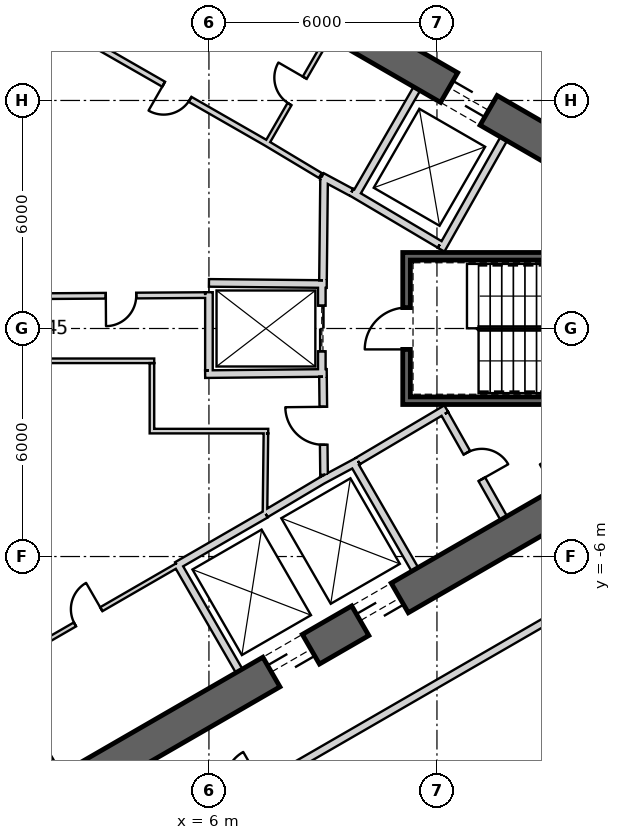
"""IFC4 building model, lengths in metres.
Left out: names, types, materials, properties, quantities, classifications, styles, units other than length and angle.
Written with IfcOpenShell. Run it as: python <this file> out.ifc"""

import sys

from ifc_helpers import new_model, si_unit, direction, frame, frame_2d, origin, place, context, subcontext, project, spatial, rectangle, extrude, element, fill, save


model = new_model("IFC4")
c1 = context("Model", 3, precision=1e-05, world=origin(), true_north=direction((0.0, 1.0)))
c2 = subcontext(c1, "Body", "Model", "MODEL_VIEW")
j1 = project(units=[si_unit("LENGTHUNIT", "METRE"), si_unit("PLANEANGLEUNIT", "RADIAN")], contexts=[c1])
p1 = place(None, origin())
s1 = spatial("IfcSite", under=j1, at=p1, CompositionType="ELEMENT")
p2 = place(p1, origin())
s2 = spatial("IfcBuilding", under=s1, at=p2, CompositionType="ELEMENT")
p3 = place(p2, frame((0.0, 0.0, 380.6)))
s3 = spatial("IfcBuildingStorey", under=s2, at=p3, CompositionType="ELEMENT", Elevation=380.6)
p4 = place(p3, frame((19.475, 2.208, 0.0), z_axis=(0.0, 0.0, 1.0), x_axis=(-0.866028369851, 0.499994862586, 0.0)))
e1 = element("IfcWall", 1, at=p4, inside=s3, PredefinedType="SHEAR", context=c2, shape_type="SweptSolid", body=[
    extrude(rectangle(XDim=31.523, YDim=0.9, at=frame_2d((15.762, 0.0))), origin(), (0.0, 0.0, 1.0), 3.9),
])
p5 = place(p4, frame((7.062, 0.0, 0.0)))
e2 = element("IfcOpeningElement", 2, at=p5, cuts=e1, PredefinedType="OPENING", context=c2, shape_type="SweptSolid", body=[
    extrude(rectangle(XDim=1.2, YDim=2.4, at=frame_2d((0.6, 1.2))), frame((0.0, 0.46, 0.0), z_axis=(0.0, -1.0, 0.0), x_axis=(1.0, 0.0, 0.0)), (0.0, 0.0, 1.0), 0.92),
])
p6 = place(p4, frame((3.612, 0.0, 0.0)))
e3 = element("IfcOpeningElement", 3, at=p6, cuts=e1, PredefinedType="OPENING", context=c2, shape_type="SweptSolid", body=[
    extrude(rectangle(XDim=1.2, YDim=2.4, at=frame_2d((0.6, 1.2))), frame((0.0, 0.46, 0.0), z_axis=(0.0, -1.0, 0.0), x_axis=(1.0, 0.0, 0.0)), (0.0, 0.0, 1.0), 0.92),
])
p7 = place(p4, frame((26.712, 0.0, 0.0)))
e4 = element("IfcOpeningElement", 4, at=p7, cuts=e1, PredefinedType="OPENING", context=c2, shape_type="SweptSolid", body=[
    extrude(rectangle(XDim=1.2, YDim=2.4, at=frame_2d((0.6, 1.2))), frame((0.0, 0.46, 0.0), z_axis=(0.0, -1.0, 0.0), x_axis=(1.0, 0.0, 0.0)), (0.0, 0.0, 1.0), 0.92),
])
p8 = place(p3, frame((-7.825, -17.97, 0.0), z_axis=(0.0, 0.0, 1.0), x_axis=(0.866028369851, 0.499994862586, 0.0)))
e5 = element("IfcWall", 5, at=p8, inside=s3, PredefinedType="SHEAR", context=c2, shape_type="SweptSolid", body=[
    extrude(rectangle(XDim=31.523, YDim=0.9, at=frame_2d((15.762, 0.0))), origin(), (0.0, 0.0, 1.0), 3.9),
])
p9 = place(p8, frame((17.862, 0.0, 0.0)))
e6 = element("IfcOpeningElement", 6, at=p9, cuts=e5, PredefinedType="OPENING", context=c2, shape_type="SweptSolid", body=[
    extrude(rectangle(XDim=1.2, YDim=2.4, at=frame_2d((0.6, 1.2))), frame((0.0, 0.46, 0.0), z_axis=(0.0, -1.0, 0.0), x_axis=(1.0, 0.0, 0.0)), (0.0, 0.0, 1.0), 0.92),
])
p10 = place(p8, frame((20.562, 0.0, 0.0)))
e7 = element("IfcOpeningElement", 7, at=p10, cuts=e5, PredefinedType="OPENING", context=c2, shape_type="SweptSolid", body=[
    extrude(rectangle(XDim=1.2, YDim=2.4, at=frame_2d((0.6, 1.2))), frame((0.0, 0.46, 0.0), z_axis=(0.0, -1.0, 0.0), x_axis=(1.0, 0.0, 0.0)), (0.0, 0.0, 1.0), 0.92),
])
p11 = place(p8, frame((26.712, 0.0, 0.0)))
e8 = element("IfcOpeningElement", 8, at=p11, cuts=e5, PredefinedType="OPENING", context=c2, shape_type="SweptSolid", body=[
    extrude(rectangle(XDim=1.2, YDim=2.4, at=frame_2d((0.6, 1.2))), frame((0.0, 0.46, 0.0), z_axis=(0.0, -1.0, 0.0), x_axis=(1.0, 0.0, 0.0)), (0.0, 0.0, 1.0), 0.92),
])
p12 = place(p8, frame((3.612, 0.0, 0.0)))
e9 = element("IfcOpeningElement", 9, at=p12, cuts=e5, PredefinedType="OPENING", context=c2, shape_type="SweptSolid", body=[
    extrude(rectangle(XDim=1.2, YDim=2.4, at=frame_2d((0.6, 1.2))), frame((0.0, 0.46, 0.0), z_axis=(0.0, -1.0, 0.0), x_axis=(1.0, 0.0, 0.0)), (0.0, 0.0, 1.0), 0.92),
])
p13 = place(p3, frame((9.847, 3.495, 0.0), z_axis=(0.0, 0.0, 1.0), x_axis=(0.499984717929, 0.866034226713, 0.0)))
e10 = element("IfcWall", 10, at=p13, inside=s3, PredefinedType="PLUMBINGWALL", context=c2, shape_type="SweptSolid", body=[
    extrude(rectangle(XDim=3.25, YDim=0.2, at=frame_2d((1.625, 0.0))), origin(), (0.0, 0.0, 1.0), 3.6),
])
p14 = place(p3, frame((12.11, 2.073, 0.0), z_axis=(0.0, 0.0, 1.0), x_axis=(0.49196600604, 0.870614408852, 0.0)))
e11 = element("IfcWall", 11, at=p14, inside=s3, PredefinedType="PLUMBINGWALL", context=c2, shape_type="SweptSolid", body=[
    extrude(rectangle(XDim=3.35, YDim=0.2, at=frame_2d((1.675, 0.0))), origin(), (0.0, 0.0, 1.0), 3.6),
])
p15 = place(p3, frame((12.073, 2.211, 0.0), z_axis=(0.0, 0.0, 1.0), x_axis=(-0.860414880418, 0.509594185166, 0.0)))
e12 = element("IfcWall", 12, at=p15, inside=s3, PredefinedType="PLUMBINGWALL", context=c2, shape_type="SweptSolid", body=[
    extrude(rectangle(XDim=2.7, YDim=0.2, at=frame_2d((1.35, 0.0))), origin(), (0.0, 0.0, 1.0), 3.6),
])
p16 = place(p3, frame((6.795, -9.01, 0.0), z_axis=(0.0, 0.0, 1.0), x_axis=(-0.499984717929, 0.866034226713, 0.0)))
e13 = element("IfcWall", 13, at=p16, inside=s3, PredefinedType="PLUMBINGWALL", context=c2, shape_type="SweptSolid", body=[
    extrude(rectangle(XDim=3.25, YDim=0.2, at=frame_2d((1.625, 0.0))), origin(), (0.0, 0.0, 1.0), 3.6),
])
p17 = place(p3, frame((5.159, -6.236, 0.0), z_axis=(0.0, 0.0, 1.0), x_axis=(0.866036505625, 0.499980770555, 0.0)))
e14 = element("IfcWall", 14, at=p17, inside=s3, PredefinedType="PLUMBINGWALL", context=c2, shape_type="SweptSolid", body=[
    extrude(rectangle(XDim=2.7, YDim=0.2, at=frame_2d((1.35, 0.0))), origin(), (0.0, 0.0, 1.0), 3.6),
])
p18 = place(p3, frame((9.795, -3.525, 0.0), z_axis=(0.0, 0.0, 1.0), x_axis=(0.499984717929, -0.866034226713, 0.0)))
e15 = element("IfcWall", 15, at=p18, inside=s3, PredefinedType="PLUMBINGWALL", context=c2, shape_type="SweptSolid", body=[
    extrude(rectangle(XDim=3.25, YDim=0.2, at=frame_2d((1.625, 0.0))), origin(), (0.0, 0.0, 1.0), 3.6),
])
p19 = place(p3, frame((8.974, -3.999, 0.0), z_axis=(0.0, 0.0, 1.0), x_axis=(0.880907015104, 0.473289373154, 0.0)))
e16 = element("IfcWall", 16, at=p19, inside=s3, PredefinedType="PLUMBINGWALL", context=c2, shape_type="SweptSolid", body=[
    extrude(rectangle(XDim=1.078, YDim=0.2, at=frame_2d((0.539, 0.0))), origin(), (0.0, 0.0, 1.0), 3.6),
])
p20 = place(p3, frame((7.497, -4.886, 0.0), z_axis=(0.0, 0.0, 1.0), x_axis=(0.857516281273, 0.51445682749, 0.0)))
e17 = element("IfcWall", 17, at=p20, inside=s3, PredefinedType="PLUMBINGWALL", context=c2, shape_type="SweptSolid", body=[
    extrude(rectangle(XDim=1.845, YDim=0.2, at=frame_2d((0.922, 0.0))), origin(), (0.0, 0.0, 1.0), 3.6),
])
p21 = place(p3, frame((19.2, 1.9, -0.3), z_axis=(0.0, 0.0, 1.0), x_axis=(-1.0, 0.0, 0.0)))
e18 = element("IfcWall", 18, at=p21, inside=s3, PredefinedType="SHEAR", context=c2, shape_type="SweptSolid", body=[
    extrude(rectangle(XDim=8.1, YDim=0.2, at=frame_2d((4.05, 0.0))), origin(), (0.0, 0.0, 1.0), 3.9),
])
p22 = place(p3, frame((11.1, -1.9, -0.3), z_axis=(0.0, 0.0, 1.0), x_axis=(1.0, 0.0, 0.0)))
e19 = element("IfcWall", 19, at=p22, inside=s3, PredefinedType="SHEAR", context=c2, shape_type="SweptSolid", body=[
    extrude(rectangle(XDim=7.9, YDim=0.2, at=frame_2d((3.95, 0.0))), origin(), (0.0, 0.0, 1.0), 3.9),
])
p23 = place(p3, frame((11.2, -1.8, -0.3), z_axis=(0.0, 0.0, 1.0), x_axis=(0.0, 1.0, 0.0)))
e20 = element("IfcWall", 20, at=p23, inside=s3, PredefinedType="SHEAR", context=c2, shape_type="SweptSolid", body=[
    extrude(rectangle(XDim=3.6, YDim=0.2, at=frame_2d((1.8, 0.0))), origin(), (0.0, 0.0, 1.0), 3.9),
])
p24 = place(p23, frame((1.25, 0.0, 0.3)))
e21 = element("IfcOpeningElement", 21, at=p24, cuts=e20, PredefinedType="OPENING", context=c2, shape_type="SweptSolid", body=[
    extrude(rectangle(XDim=1.1, YDim=2.1, at=frame_2d((0.55, 1.05))), frame((0.0, 0.11, 0.0), z_axis=(0.0, -1.0, 0.0), x_axis=(1.0, 0.0, 0.0)), (0.0, 0.0, 1.0), 0.22),
])
p25 = place(p3, frame((8.97, 1.2, 0.0), z_axis=(0.0, 0.0, 1.0), x_axis=(0.0, -1.0, 0.0)))
e22 = element("IfcWall", 22, at=p25, inside=s3, PredefinedType="PLUMBINGWALL", context=c2, shape_type="SweptSolid", body=[
    extrude(rectangle(XDim=2.4, YDim=0.2, at=frame_2d((1.2, 0.0))), origin(), (0.0, 0.0, 1.0), 3.6),
])
p26 = place(p25, frame((0.6, 0.0, 0.0)))
e23 = element("IfcOpeningElement", 23, at=p26, cuts=e22, PredefinedType="OPENING", context=c2, shape_type="SweptSolid", body=[
    extrude(rectangle(XDim=1.2, YDim=2.4, at=frame_2d((0.6, 1.2))), frame((0.0, 0.11, 0.0), z_axis=(0.0, -1.0, 0.0), x_axis=(1.0, 0.0, 0.0)), (0.0, 0.0, 1.0), 0.22),
])
p27 = place(p3, frame((9.1, -1.169, 0.0), z_axis=(0.0, 0.0, 1.0), x_axis=(-0.999949988, -0.010001074852, 0.0)))
e24 = element("IfcWall", 24, at=p27, inside=s3, PredefinedType="PLUMBINGWALL", context=c2, shape_type="SweptSolid", body=[
    extrude(rectangle(XDim=3.1, YDim=0.2, at=frame_2d((1.55, 0.0))), origin(), (0.0, 0.0, 1.0), 3.6),
])
p28 = place(p3, frame((6.0, -1.104, 0.0), z_axis=(0.0, 0.0, 1.0), x_axis=(0.0, 1.0, 0.0)))
e25 = element("IfcWall", 25, at=p28, inside=s3, PredefinedType="PLUMBINGWALL", context=c2, shape_type="SweptSolid", body=[
    extrude(rectangle(XDim=2.405, YDim=0.2, at=frame_2d((1.202, 0.0))), origin(), (0.0, 0.0, 1.0), 3.6),
])
p29 = place(p3, frame((9.1, 1.169, 0.0), z_axis=(0.0, 0.0, 1.0), x_axis=(-0.99994990606, 0.010009264196, 0.0)))
e26 = element("IfcWall", 26, at=p29, inside=s3, PredefinedType="PLUMBINGWALL", context=c2, shape_type="SweptSolid", body=[
    extrude(rectangle(XDim=3.0, YDim=0.2, at=frame_2d((1.5, 0.0))), origin(), (0.0, 0.0, 1.0), 3.6),
])
p30 = place(p3, frame((8.974, 3.999, 0.0), z_axis=(0.0, 0.0, 1.0), x_axis=(0.880917147855, -0.473270513147, 0.0)))
e27 = element("IfcWall", 27, at=p30, inside=s3, PredefinedType="PARTITIONING", context=c2, shape_type="SweptSolid", body=[
    extrude(rectangle(XDim=0.878, YDim=0.2, at=frame_2d((0.439, 0.0))), origin(), (0.0, 0.0, 1.0), 3.6),
])
p31 = place(p3, frame((7.53, 4.833, 0.0), z_axis=(0.0, 0.0, 1.0), x_axis=(-0.863270393362, 0.50474174381, 0.0)))
e28 = element("IfcWall", 28, at=p31, inside=s3, PredefinedType="PLUMBINGWALL", context=c2, shape_type="SweptSolid", body=[
    extrude(rectangle(XDim=5.455, YDim=0.15, at=frame_2d((2.728, 0.0))), origin(), (0.0, 0.0, 1.0), 3.6),
])
p32 = place(p3, frame((7.55, 4.821, 0.0), z_axis=(0.0, 0.0, 1.0), x_axis=(0.866019818373, -0.500009674092, 0.0)))
e29 = element("IfcWall", 29, at=p32, inside=s3, PredefinedType="PARTITIONING", context=c2, shape_type="SweptSolid", body=[
    extrude(rectangle(XDim=1.594, YDim=0.12, at=frame_2d((0.797, 0.0))), origin(), (0.0, 0.0, 1.0), 3.6),
])
p33 = place(p32, frame((0.397, 0.0, 0.0)))
e30 = element("IfcOpeningElement", 30, at=p33, cuts=e29, PredefinedType="OPENING", context=c2, shape_type="SweptSolid", body=[
    extrude(rectangle(XDim=0.8, YDim=2.1, at=frame_2d((0.4, 1.05))), frame((0.0, 0.07, 0.0), z_axis=(0.0, -1.0, 0.0), x_axis=(1.0, 0.0, 0.0)), (0.0, 0.0, 1.0), 0.14),
])
p34 = place(p3, frame((4.405, -10.389, 0.0), z_axis=(0.0, 0.0, 1.0), x_axis=(-0.500017246033, 0.866015446554, 0.0)))
e31 = element("IfcWall", 31, at=p34, inside=s3, PredefinedType="PARTITIONING", context=c2, shape_type="SweptSolid", body=[
    extrude(rectangle(XDim=3.25, YDim=0.12, at=frame_2d((1.625, 0.0))), origin(), (0.0, 0.0, 1.0), 3.6),
])
p35 = place(p34, frame((1.225, 0.0, 0.0)))
e32 = element("IfcOpeningElement", 32, at=p35, cuts=e31, PredefinedType="OPENING", context=c2, shape_type="SweptSolid", body=[
    extrude(rectangle(XDim=0.8, YDim=2.1, at=frame_2d((0.4, 1.05))), frame((0.0, 0.07, 0.0), z_axis=(0.0, -1.0, 0.0), x_axis=(1.0, 0.0, 0.0)), (0.0, 0.0, 1.0), 0.14),
])
p36 = place(p3, frame((0.42, -8.938, 0.0), z_axis=(0.0, 0.0, 1.0), x_axis=(0.871409832999, 0.490555708306, 0.0)))
e33 = element("IfcWall", 33, at=p36, inside=s3, PredefinedType="PLUMBINGWALL", context=c2, shape_type="SweptSolid", body=[
    extrude(rectangle(XDim=2.755, YDim=0.15, at=frame_2d((1.377, 0.0))), origin(), (0.0, 0.0, 1.0), 3.6),
])
p37 = place(p3, frame((2.821, -7.586, 0.0), z_axis=(0.0, 0.0, 1.0), x_axis=(0.866019956843, 0.50000943426, 0.0)))
e34 = element("IfcWall", 34, at=p37, inside=s3, PredefinedType="PLUMBINGWALL", context=c2, shape_type="SweptSolid", body=[
    extrude(rectangle(XDim=2.7, YDim=0.15, at=frame_2d((1.35, 0.0))), origin(), (0.0, 0.0, 1.0), 3.6),
])
p38 = place(p3, frame((12.245, -2.109, 0.0), z_axis=(0.0, 0.0, 1.0), x_axis=(-0.860414880418, -0.509594185166, 0.0)))
e35 = element("IfcWall", 35, at=p38, inside=s3, PredefinedType="PARTITIONING", context=c2, shape_type="SweptSolid", body=[
    extrude(rectangle(XDim=2.7, YDim=0.2, at=frame_2d((1.35, 0.0))), origin(), (0.0, 0.0, 1.0), 3.6),
])
p39 = place(p3, frame((13.758, -4.99, 0.0), z_axis=(0.0, 0.0, 1.0), x_axis=(-0.491993409184, 0.87059892334, 0.0)))
e36 = element("IfcWall", 36, at=p39, inside=s3, PredefinedType="PARTITIONING", context=c2, shape_type="SweptSolid", body=[
    extrude(rectangle(XDim=3.15, YDim=0.2, at=frame_2d((1.575, 0.0))), origin(), (0.0, 0.0, 1.0), 3.6),
])
p40 = place(p39, frame((1.175, 0.0, 0.0)))
e37 = element("IfcOpeningElement", 37, at=p40, cuts=e36, PredefinedType="OPENING", context=c2, shape_type="SweptSolid", body=[
    extrude(rectangle(XDim=0.8, YDim=2.1, at=frame_2d((0.4, 1.05))), frame((0.0, 0.11, 0.0), z_axis=(0.0, -1.0, 0.0), x_axis=(1.0, 0.0, 0.0)), (0.0, 0.0, 1.0), 0.22),
])
p41 = place(p3, frame((9.029, -3.851, 0.0), z_axis=(0.0, 0.0, 1.0), x_axis=(-0.010784614026, 0.999941844359, 0.0)))
e38 = element("IfcWall", 38, at=p41, inside=s3, PredefinedType="PARTITIONING", context=c2, shape_type="SweptSolid", body=[
    extrude(rectangle(XDim=2.581, YDim=0.2, at=frame_2d((1.291, 0.0))), origin(), (0.0, 0.0, 1.0), 3.6),
])
p42 = place(p3, frame((9.001, 1.27, 0.0), z_axis=(0.0, 0.0, 1.0), x_axis=(0.010723968736, 0.999942496594, 0.0)))
e39 = element("IfcWall", 39, at=p42, inside=s3, PredefinedType="PARTITIONING", context=c2, shape_type="SweptSolid", body=[
    extrude(rectangle(XDim=2.709, YDim=0.2, at=frame_2d((1.354, 0.0))), origin(), (0.0, 0.0, 1.0), 3.6),
])
p43 = place(p42, frame((0.848, 0.0, 0.0)))
e40 = element("IfcOpeningElement", 40, at=p43, cuts=e39, PredefinedType="OPENING", context=c2, shape_type="SweptSolid", body=[
    extrude(rectangle(XDim=1.0, YDim=2.1, at=frame_2d((0.5, 1.05))), frame((0.0, 0.11, 0.0), z_axis=(0.0, -1.0, 0.0), x_axis=(1.0, 0.0, 0.0)), (0.0, 0.0, 1.0), 0.22),
])
p44 = place(p3, frame((5.548, -1.0, 0.0), z_axis=(0.0, 0.0, 1.0), x_axis=(-0.772345431507, -0.635202750648, 0.0)))
e41 = element("IfcWall", 41, at=p44, inside=s3, PredefinedType="PLUMBINGWALL", context=c2, shape_type="SweptSolid", body=[
    extrude(rectangle(XDim=7.415, YDim=0.15, at=frame_2d((3.707, 0.0))), origin(), (0.0, 0.0, 1.0), 3.6),
])
p45 = place(p3, frame((5.9, -1.03, 0.0), z_axis=(0.0, 0.0, 1.0), x_axis=(-1.0, 0.0, 0.0)))
e42 = element("IfcWall", 42, at=p45, inside=s3, PredefinedType="PLUMBINGWALL", context=c2, shape_type="SweptSolid", body=[
    extrude(rectangle(XDim=0.4, YDim=0.15, at=frame_2d((0.2, 0.0))), origin(), (0.0, 0.0, 1.0), 3.6),
])
p46 = place(p3, frame((5.5, -1.0, 0.0), z_axis=(0.0, 0.0, 1.0), x_axis=(-1.0, 0.0, 0.0)))
e43 = element("IfcWall", 43, at=p46, inside=s3, PredefinedType="PARTITIONING", context=c2, shape_type="SweptSolid", body=[
    extrude(rectangle(XDim=3.836, YDim=0.12, at=frame_2d((1.918, 0.0))), origin(), (0.0, 0.0, 1.0), 3.6),
])
p47 = place(p46, frame((1.518, 0.0, 0.0)))
e44 = element("IfcOpeningElement", 44, at=p47, cuts=e43, PredefinedType="OPENING", context=c2, shape_type="SweptSolid", body=[
    extrude(rectangle(XDim=0.8, YDim=2.1, at=frame_2d((0.4, 1.05))), frame((0.0, 0.07, 0.0), z_axis=(0.0, -1.0, 0.0), x_axis=(1.0, 0.0, 0.0)), (0.0, 0.0, 1.0), 0.14),
])
p48 = place(p3, frame((7.501, 2.625, 0.0), z_axis=(0.0, 0.0, 1.0), x_axis=(-0.011798588722, 0.99993039423, 0.0)))
e45 = element("IfcWall", 45, at=p48, inside=s3, PredefinedType="PLUMBINGWALL", context=c2, shape_type="SweptSolid", body=[
    extrude(rectangle(XDim=2.152, YDim=0.15, at=frame_2d((1.076, 0.0))), origin(), (0.0, 0.0, 1.0), 3.6),
])
p49 = place(p3, frame((4.425, 2.7, 0.0), z_axis=(0.0, 0.0, 1.0), x_axis=(1.0, 0.0, 0.0)))
e46 = element("IfcWall", 46, at=p49, inside=s3, PredefinedType="PLUMBINGWALL", context=c2, shape_type="SweptSolid", body=[
    extrude(rectangle(XDim=3.0, YDim=0.15, at=frame_2d((1.5, 0.0))), origin(), (0.0, 0.0, 1.0), 3.6),
])
p50 = place(p49, frame((1.137, 0.0, 0.0)))
e47 = element("IfcOpeningElement", 47, at=p50, cuts=e46, PredefinedType="OPENING", context=c2, shape_type="SweptSolid", body=[
    extrude(rectangle(XDim=0.8, YDim=2.1, at=frame_2d((0.4, 1.05))), frame((0.0, 0.085, 0.0), z_axis=(0.0, -1.0, 0.0), x_axis=(1.0, 0.0, 0.0)), (0.0, 0.0, 1.0), 0.17),
])
p51 = place(p3, frame((4.5, 0.925, 0.0), z_axis=(0.0, 0.0, 1.0), x_axis=(0.0, 1.0, 0.0)))
e48 = element("IfcWall", 48, at=p51, inside=s3, PredefinedType="PLUMBINGWALL", context=c2, shape_type="SweptSolid", body=[
    extrude(rectangle(XDim=1.7, YDim=0.15, at=frame_2d((0.85, 0.0))), origin(), (0.0, 0.0, 1.0), 3.6),
])
p52 = place(p3, frame((1.516, 1.0, 0.0), z_axis=(0.0, 0.0, 1.0), x_axis=(1.0, 0.0, 0.0)))
e49 = element("IfcWall", 49, at=p52, inside=s3, PredefinedType="PLUMBINGWALL", context=c2, shape_type="SweptSolid", body=[
    extrude(rectangle(XDim=2.909, YDim=0.15, at=frame_2d((1.455, 0.0))), origin(), (0.0, 0.0, 1.0), 3.6),
])
p53 = place(p3, frame((21.126, 4.084, 0.0), z_axis=(0.0, 0.0, 1.0), x_axis=(-0.866025296335, 0.500000186108, 0.0)))
e50 = element("IfcWall", 50, at=p53, inside=s3, PredefinedType="PARTITIONING", context=c2, shape_type="SweptSolid", body=[
    extrude(rectangle(XDim=22.523, YDim=0.12, at=frame_2d((11.262, 0.0))), origin(), (0.0, 0.0, 1.0), 2.97),
])
p54 = place(p53, frame((10.86, 0.0, 0.0)))
e51 = element("IfcOpeningElement", 51, at=p54, cuts=e50, PredefinedType="OPENING", context=c2, shape_type="SweptSolid", body=[
    extrude(rectangle(XDim=1.0, YDim=2.1, at=frame_2d((0.5, 1.05))), frame((0.0, 0.07, 0.0), z_axis=(0.0, -1.0, 0.0), x_axis=(1.0, 0.0, 0.0)), (0.0, 0.0, 1.0), 0.14),
])
p55 = place(p3, frame((6.565, -12.491, 0.0), z_axis=(0.0, 0.0, 1.0), x_axis=(0.866025195272, 0.500000361154, 0.0)))
e52 = element("IfcWall", 52, at=p55, inside=s3, PredefinedType="PARTITIONING", context=c2, shape_type="SweptSolid", body=[
    extrude(rectangle(XDim=16.654, YDim=0.2, at=frame_2d((8.327, 0.0))), origin(), (0.0, 0.0, 1.0), 2.97),
])
p56 = place(p55, frame((7.856, 0.0, 0.0)))
e53 = element("IfcOpeningElement", 53, at=p56, cuts=e52, PredefinedType="OPENING", context=c2, shape_type="SweptSolid", body=[
    extrude(rectangle(XDim=1.0, YDim=2.1, at=frame_2d((0.5, 1.05))), frame((0.0, 0.11, 0.0), z_axis=(0.0, -1.0, 0.0), x_axis=(1.0, 0.0, 0.0)), (0.0, 0.0, 1.0), 0.22),
])
p57 = place(p24, origin())
e54 = element("IfcDoor", 54, at=p57, inside=s3, OperationType="SINGLE_SWING_RIGHT", PredefinedType="USERDEFINED", context=c2, shape_type="SweptSolid", body=[
    extrude(rectangle(XDim=1.1, YDim=2.1, at=frame_2d((0.55, 1.05))), frame((0.0, 0.025, 0.0), z_axis=(0.0, -1.0, 0.0), x_axis=(1.0, 0.0, 0.0)), (0.0, 0.0, 1.0), 0.05),
])
fill(e21, e54)
p58 = place(p43, origin())
e55 = element("IfcDoor", 55, at=p58, inside=s3, OperationType="SINGLE_SWING_RIGHT", PredefinedType="USERDEFINED", context=c2, shape_type="SweptSolid", body=[
    extrude(rectangle(XDim=1.0, YDim=2.1, at=frame_2d((0.5, 1.05))), frame((0.0, 0.025, 0.0), z_axis=(0.0, -1.0, 0.0), x_axis=(1.0, 0.0, 0.0)), (0.0, 0.0, 1.0), 0.05),
])
fill(e40, e55)
p59 = place(p26, origin())
e56 = element("IfcDoor", 56, at=p59, inside=s3, OperationType="SLIDING_TO_LEFT", PredefinedType="USERDEFINED", context=c2, shape_type="SweptSolid", body=[
    extrude(rectangle(XDim=1.2, YDim=2.4, at=frame_2d((0.6, 1.2))), frame((0.0, 0.025, 0.0), z_axis=(0.0, -1.0, 0.0), x_axis=(1.0, 0.0, 0.0)), (0.0, 0.0, 1.0), 0.05),
])
fill(e23, e56)
p60 = place(p47, origin())
e57 = element("IfcDoor", 57, at=p60, inside=s3, OperationType="SINGLE_SWING_LEFT", PredefinedType="USERDEFINED", context=c2, shape_type="SweptSolid", body=[
    extrude(rectangle(XDim=0.8, YDim=2.1, at=frame_2d((0.4, 1.05))), frame((0.0, 0.025, 0.0), z_axis=(0.0, -1.0, 0.0), x_axis=(1.0, 0.0, 0.0)), (0.0, 0.0, 1.0), 0.05),
])
fill(e44, e57)
p61 = place(p50, origin())
e58 = element("IfcDoor", 58, at=p61, inside=s3, OperationType="SINGLE_SWING_RIGHT", PredefinedType="USERDEFINED", context=c2, shape_type="SweptSolid", body=[
    extrude(rectangle(XDim=0.8, YDim=2.1, at=frame_2d((0.4, 1.05))), frame((0.0, 0.025, 0.0), z_axis=(0.0, -1.0, 0.0), x_axis=(1.0, 0.0, 0.0)), (0.0, 0.0, 1.0), 0.05),
])
fill(e47, e58)
p62 = place(p33, origin())
e59 = element("IfcDoor", 59, at=p62, inside=s3, OperationType="SINGLE_SWING_LEFT", PredefinedType="USERDEFINED", context=c2, shape_type="SweptSolid", body=[
    extrude(rectangle(XDim=0.8, YDim=2.1, at=frame_2d((0.4, 1.05))), frame((0.0, 0.025, 0.0), z_axis=(0.0, -1.0, 0.0), x_axis=(1.0, 0.0, 0.0)), (0.0, 0.0, 1.0), 0.05),
])
fill(e30, e59)
p63 = place(p35, origin())
e60 = element("IfcDoor", 60, at=p63, inside=s3, OperationType="SINGLE_SWING_LEFT", PredefinedType="USERDEFINED", context=c2, shape_type="SweptSolid", body=[
    extrude(rectangle(XDim=0.8, YDim=2.1, at=frame_2d((0.4, 1.05))), frame((0.0, 0.025, 0.0), z_axis=(0.0, -1.0, 0.0), x_axis=(1.0, 0.0, 0.0)), (0.0, 0.0, 1.0), 0.05),
])
fill(e32, e60)
p64 = place(p40, origin())
e61 = element("IfcDoor", 61, at=p64, inside=s3, OperationType="SINGLE_SWING_LEFT", PredefinedType="USERDEFINED", context=c2, shape_type="SweptSolid", body=[
    extrude(rectangle(XDim=0.8, YDim=2.1, at=frame_2d((0.4, 1.05))), frame((0.0, 0.025, 0.0), z_axis=(0.0, -1.0, 0.0), x_axis=(1.0, 0.0, 0.0)), (0.0, 0.0, 1.0), 0.05),
])
fill(e37, e61)
p65 = place(p56, origin())
e62 = element("IfcDoor", 62, at=p65, inside=s3, OperationType="SINGLE_SWING_LEFT", PredefinedType="USERDEFINED", context=c2, shape_type="SweptSolid", body=[
    extrude(rectangle(XDim=1.0, YDim=2.1, at=frame_2d((0.5, 1.05))), frame((0.0, 0.025, 0.0), z_axis=(0.0, -1.0, 0.0), x_axis=(1.0, 0.0, 0.0)), (0.0, 0.0, 1.0), 0.05),
])
fill(e53, e62)
p66 = place(p5, origin())
e63 = element("IfcDoor", 63, at=p66, inside=s3, OperationType="SLIDING_TO_LEFT", PredefinedType="USERDEFINED", context=c2, shape_type="SweptSolid", body=[
    extrude(rectangle(XDim=1.2, YDim=2.4, at=frame_2d((0.6, 1.2))), frame((0.0, 0.025, 0.0), z_axis=(0.0, -1.0, 0.0), x_axis=(1.0, 0.0, 0.0)), (0.0, 0.0, 1.0), 0.05),
])
fill(e2, e63)
p67 = place(p9, origin())
e64 = element("IfcDoor", 64, at=p67, inside=s3, OperationType="SLIDING_TO_LEFT", PredefinedType="USERDEFINED", context=c2, shape_type="SweptSolid", body=[
    extrude(rectangle(XDim=1.2, YDim=2.4, at=frame_2d((0.6, 1.2))), frame((0.0, 0.025, 0.0), z_axis=(0.0, -1.0, 0.0), x_axis=(1.0, 0.0, 0.0)), (0.0, 0.0, 1.0), 0.05),
])
fill(e6, e64)
p68 = place(p10, origin())
e65 = element("IfcDoor", 65, at=p68, inside=s3, OperationType="SLIDING_TO_LEFT", PredefinedType="USERDEFINED", context=c2, shape_type="SweptSolid", body=[
    extrude(rectangle(XDim=1.2, YDim=2.4, at=frame_2d((0.6, 1.2))), frame((0.0, 0.025, 0.0), z_axis=(0.0, -1.0, 0.0), x_axis=(1.0, 0.0, 0.0)), (0.0, 0.0, 1.0), 0.05),
])
fill(e7, e65)
save(model, sys.argv[1])
